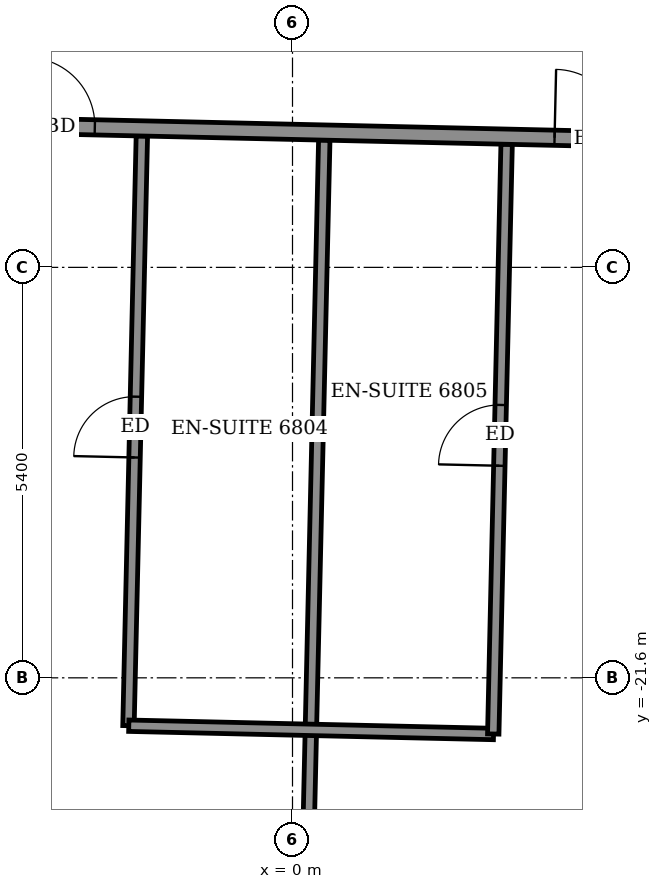
"""IFC4 building model, lengths in metres.
Left out: names, types, materials, properties, quantities, classifications, styles, units other than length and angle.
Written with IfcOpenShell. Run it as: python <this file> out.ifc"""

import sys

from ifc_helpers import new_model, si_unit, direction, frame, frame_2d, origin, place, context, subcontext, project, spatial, rectangle, extrude, element, fill, save


model = new_model("IFC4")
c1 = context("Model", 3, precision=1e-05, world=origin(), true_north=direction((0.0, 1.0)))
c2 = subcontext(c1, "Body", "Model", "MODEL_VIEW")
j1 = project(units=[si_unit("LENGTHUNIT", "METRE"), si_unit("PLANEANGLEUNIT", "RADIAN")], contexts=[c1])
p1 = place(None, origin())
s1 = spatial("IfcSite", under=j1, at=p1, CompositionType="ELEMENT")
p2 = place(p1, origin())
s2 = spatial("IfcBuilding", under=s1, at=p2, CompositionType="ELEMENT")
p3 = place(p2, frame((0.0, 0.0, 268.1)))
s3 = spatial("IfcBuildingStorey", under=s2, at=p3, CompositionType="ELEMENT", Elevation=268.1)
p4 = place(p3, frame((0.143, -26.623, 0.0), z_axis=(0.0, 0.0, 1.0), x_axis=(0.022718655443, 0.999741898039, 0.0)))
e1 = element("IfcWall", 1, at=p4, inside=s3, PredefinedType="PARTITIONING", context=c2, shape_type="SweptSolid", body=[
    extrude(rectangle(XDim=12.1, YDim=0.15, at=frame_2d((6.05, 0.0))), origin(), (0.0, 0.0, 1.0), 2.55),
])
p5 = place(p3, frame((-2.158, -22.23, 0.0), z_axis=(0.0, 0.0, 1.0), x_axis=(0.022683528451, 0.999742695666, 0.0)))
e2 = element("IfcWall", 2, at=p5, inside=s3, PredefinedType="PARTITIONING", context=c2, shape_type="SweptSolid", body=[
    extrude(rectangle(XDim=7.76, YDim=0.15, at=frame_2d((3.88, 0.0))), origin(), (0.0, 0.0, 1.0), 3.05),
])
p6 = place(p5, frame((3.53, 0.0, 0.0)))
e3 = element("IfcOpeningElement", 3, at=p6, cuts=e2, PredefinedType="OPENING", context=c2, shape_type="SweptSolid", body=[
    extrude(rectangle(XDim=0.8, YDim=2.1, at=frame_2d((0.4, 1.05))), frame((0.0, 0.085, 0.0), z_axis=(0.0, -1.0, 0.0), x_axis=(1.0, 0.0, 0.0)), (0.0, 0.0, 1.0), 0.17),
])
p7 = place(p3, frame((-2.154, -22.23, 0.0), z_axis=(0.0, 0.0, 1.0), x_axis=(0.99974154664, -0.022734113616, 0.0)))
e4 = element("IfcWall", 4, at=p7, inside=s3, PredefinedType="PARTITIONING", context=c2, shape_type="SweptSolid", body=[
    extrude(rectangle(XDim=4.8, YDim=0.15, at=frame_2d((2.4, 0.0))), origin(), (0.0, 0.0, 1.0), 3.05),
])
p8 = place(p3, frame((2.641, -22.339, 0.0), z_axis=(0.0, 0.0, 1.0), x_axis=(0.022652083401, 0.999743408639, 0.0)))
e5 = element("IfcWall", 5, at=p8, inside=s3, PredefinedType="PARTITIONING", context=c2, shape_type="SweptSolid", body=[
    extrude(rectangle(XDim=7.76, YDim=0.15, at=frame_2d((3.88, 0.0))), origin(), (0.0, 0.0, 1.0), 3.05),
])
p9 = place(p8, frame((3.53, 0.0, 0.0)))
e6 = element("IfcOpeningElement", 6, at=p9, cuts=e5, PredefinedType="OPENING", context=c2, shape_type="SweptSolid", body=[
    extrude(rectangle(XDim=0.8, YDim=2.1, at=frame_2d((0.4, 1.05))), frame((0.0, 0.085, 0.0), z_axis=(0.0, -1.0, 0.0), x_axis=(1.0, 0.0, 0.0)), (0.0, 0.0, 1.0), 0.17),
])
p10 = place(p3, frame((-25.12, -13.847, 0.0), z_axis=(0.0, 0.0, 1.0), x_axis=(0.999742852445, -0.022676617578, 0.0)))
e7 = element("IfcWall", 7, at=p10, inside=s3, PredefinedType="PARTITIONING", context=c2, shape_type="SweptSolid", body=[
    extrude(rectangle(XDim=52.873, YDim=0.2, at=frame_2d((26.437, 0.0))), origin(), (0.0, 0.0, 1.0), 3.05),
])
p11 = place(p10, frame((2.43, 0.0, 0.0)))
e8 = element("IfcOpeningElement", 8, at=p11, cuts=e7, PredefinedType="OPENING", context=c2, shape_type="SweptSolid", body=[
    extrude(rectangle(XDim=1.0, YDim=2.1, at=frame_2d((0.5, 1.05))), frame((0.0, 0.11, 0.0), z_axis=(0.0, -1.0, 0.0), x_axis=(1.0, 0.0, 0.0)), (0.0, 0.0, 1.0), 0.22),
])
p12 = place(p10, frame((10.325, 0.0, 0.0)))
e9 = element("IfcOpeningElement", 9, at=p12, cuts=e7, PredefinedType="OPENING", context=c2, shape_type="SweptSolid", body=[
    extrude(rectangle(XDim=0.9, YDim=2.1, at=frame_2d((0.45, 1.05))), frame((0.0, 0.11, 0.0), z_axis=(0.0, -1.0, 0.0), x_axis=(1.0, 0.0, 0.0)), (0.0, 0.0, 1.0), 0.22),
])
p13 = place(p10, frame((12.575, 0.0, 0.0)))
e10 = element("IfcOpeningElement", 10, at=p13, cuts=e7, PredefinedType="OPENING", context=c2, shape_type="SweptSolid", body=[
    extrude(rectangle(XDim=0.9, YDim=2.1, at=frame_2d((0.45, 1.05))), frame((0.0, 0.11, 0.0), z_axis=(0.0, -1.0, 0.0), x_axis=(1.0, 0.0, 0.0)), (0.0, 0.0, 1.0), 0.22),
])
p14 = place(p10, frame((19.45, 0.0, 0.0)))
e11 = element("IfcOpeningElement", 11, at=p14, cuts=e7, PredefinedType="OPENING", context=c2, shape_type="SweptSolid", body=[
    extrude(rectangle(XDim=0.9, YDim=2.1, at=frame_2d((0.45, 1.05))), frame((0.0, 0.11, 0.0), z_axis=(0.0, -1.0, 0.0), x_axis=(1.0, 0.0, 0.0)), (0.0, 0.0, 1.0), 0.22),
])
p15 = place(p10, frame((21.625, 0.0, 0.0)))
e12 = element("IfcOpeningElement", 12, at=p15, cuts=e7, PredefinedType="OPENING", context=c2, shape_type="SweptSolid", body=[
    extrude(rectangle(XDim=0.9, YDim=2.1, at=frame_2d((0.45, 1.05))), frame((0.0, 0.11, 0.0), z_axis=(0.0, -1.0, 0.0), x_axis=(1.0, 0.0, 0.0)), (0.0, 0.0, 1.0), 0.22),
])
p16 = place(p10, frame((28.575, 0.0, 0.0)))
e13 = element("IfcOpeningElement", 13, at=p16, cuts=e7, PredefinedType="OPENING", context=c2, shape_type="SweptSolid", body=[
    extrude(rectangle(XDim=0.9, YDim=2.1, at=frame_2d((0.45, 1.05))), frame((0.0, 0.11, 0.0), z_axis=(0.0, -1.0, 0.0), x_axis=(1.0, 0.0, 0.0)), (0.0, 0.0, 1.0), 0.22),
])
p17 = place(p10, frame((30.875, 0.0, 0.0)))
e14 = element("IfcOpeningElement", 14, at=p17, cuts=e7, PredefinedType="OPENING", context=c2, shape_type="SweptSolid", body=[
    extrude(rectangle(XDim=0.9, YDim=2.1, at=frame_2d((0.45, 1.05))), frame((0.0, 0.11, 0.0), z_axis=(0.0, -1.0, 0.0), x_axis=(1.0, 0.0, 0.0)), (0.0, 0.0, 1.0), 0.22),
])
p18 = place(p10, frame((38.175, 0.0, 0.0)))
e15 = element("IfcOpeningElement", 15, at=p18, cuts=e7, PredefinedType="OPENING", context=c2, shape_type="SweptSolid", body=[
    extrude(rectangle(XDim=0.9, YDim=2.1, at=frame_2d((0.45, 1.05))), frame((0.0, 0.11, 0.0), z_axis=(0.0, -1.0, 0.0), x_axis=(1.0, 0.0, 0.0)), (0.0, 0.0, 1.0), 0.22),
])
p19 = place(p10, frame((40.675, 0.0, 0.0)))
e16 = element("IfcOpeningElement", 16, at=p19, cuts=e7, PredefinedType="OPENING", context=c2, shape_type="SweptSolid", body=[
    extrude(rectangle(XDim=0.9, YDim=2.1, at=frame_2d((0.45, 1.05))), frame((0.0, 0.11, 0.0), z_axis=(0.0, -1.0, 0.0), x_axis=(1.0, 0.0, 0.0)), (0.0, 0.0, 1.0), 0.22),
])
p20 = place(p10, frame((50.561, 0.0, 0.0)))
e17 = element("IfcOpeningElement", 17, at=p20, cuts=e7, PredefinedType="OPENING", context=c2, shape_type="SweptSolid", body=[
    extrude(rectangle(XDim=1.0, YDim=2.1, at=frame_2d((0.5, 1.05))), frame((0.0, 0.11, 0.0), z_axis=(0.0, -1.0, 0.0), x_axis=(1.0, 0.0, 0.0)), (0.0, 0.0, 1.0), 0.22),
])
p21 = place(p10, frame((45.6, 0.0, 0.0)))
e18 = element("IfcOpeningElement", 18, at=p21, cuts=e7, PredefinedType="OPENING", context=c2, shape_type="SweptSolid", body=[
    extrude(rectangle(XDim=0.9, YDim=2.1, at=frame_2d((0.45, 1.05))), frame((0.0, 0.11, 0.0), z_axis=(0.0, -1.0, 0.0), x_axis=(1.0, 0.0, 0.0)), (0.0, 0.0, 1.0), 0.22),
])
p22 = place(p15, origin())
e19 = element("IfcDoor", 19, at=p22, inside=s3, OperationType="SINGLE_SWING_RIGHT", PredefinedType="DOOR", context=c2, shape_type="SweptSolid", body=[
    extrude(rectangle(XDim=0.9, YDim=2.1, at=frame_2d((0.45, 1.05))), frame((0.0, 0.025, 0.0), z_axis=(0.0, -1.0, 0.0), x_axis=(1.0, 0.0, 0.0)), (0.0, 0.0, 1.0), 0.05),
])
fill(e12, e19)
p23 = place(p6, origin())
e20 = element("IfcDoor", 20, at=p23, inside=s3, OperationType="SINGLE_SWING_RIGHT", PredefinedType="DOOR", context=c2, shape_type="SweptSolid", body=[
    extrude(rectangle(XDim=0.8, YDim=2.1, at=frame_2d((0.4, 1.05))), frame((0.0, 0.025, 0.0), z_axis=(0.0, -1.0, 0.0), x_axis=(1.0, 0.0, 0.0)), (0.0, 0.0, 1.0), 0.05),
])
fill(e3, e20)
p24 = place(p16, origin())
e21 = element("IfcDoor", 21, at=p24, inside=s3, OperationType="SINGLE_SWING_LEFT", PredefinedType="DOOR", context=c2, shape_type="SweptSolid", body=[
    extrude(rectangle(XDim=0.9, YDim=2.1, at=frame_2d((0.45, 1.05))), frame((0.0, 0.025, 0.0), z_axis=(0.0, -1.0, 0.0), x_axis=(1.0, 0.0, 0.0)), (0.0, 0.0, 1.0), 0.05),
])
fill(e13, e21)
p25 = place(p9, origin())
e22 = element("IfcDoor", 22, at=p25, inside=s3, OperationType="SINGLE_SWING_LEFT", PredefinedType="DOOR", context=c2, shape_type="SweptSolid", body=[
    extrude(rectangle(XDim=0.8, YDim=2.1, at=frame_2d((0.4, 1.05))), frame((0.0, 0.025, 0.0), z_axis=(0.0, -1.0, 0.0), x_axis=(1.0, 0.0, 0.0)), (0.0, 0.0, 1.0), 0.05),
])
fill(e6, e22)
save(model, sys.argv[1])
